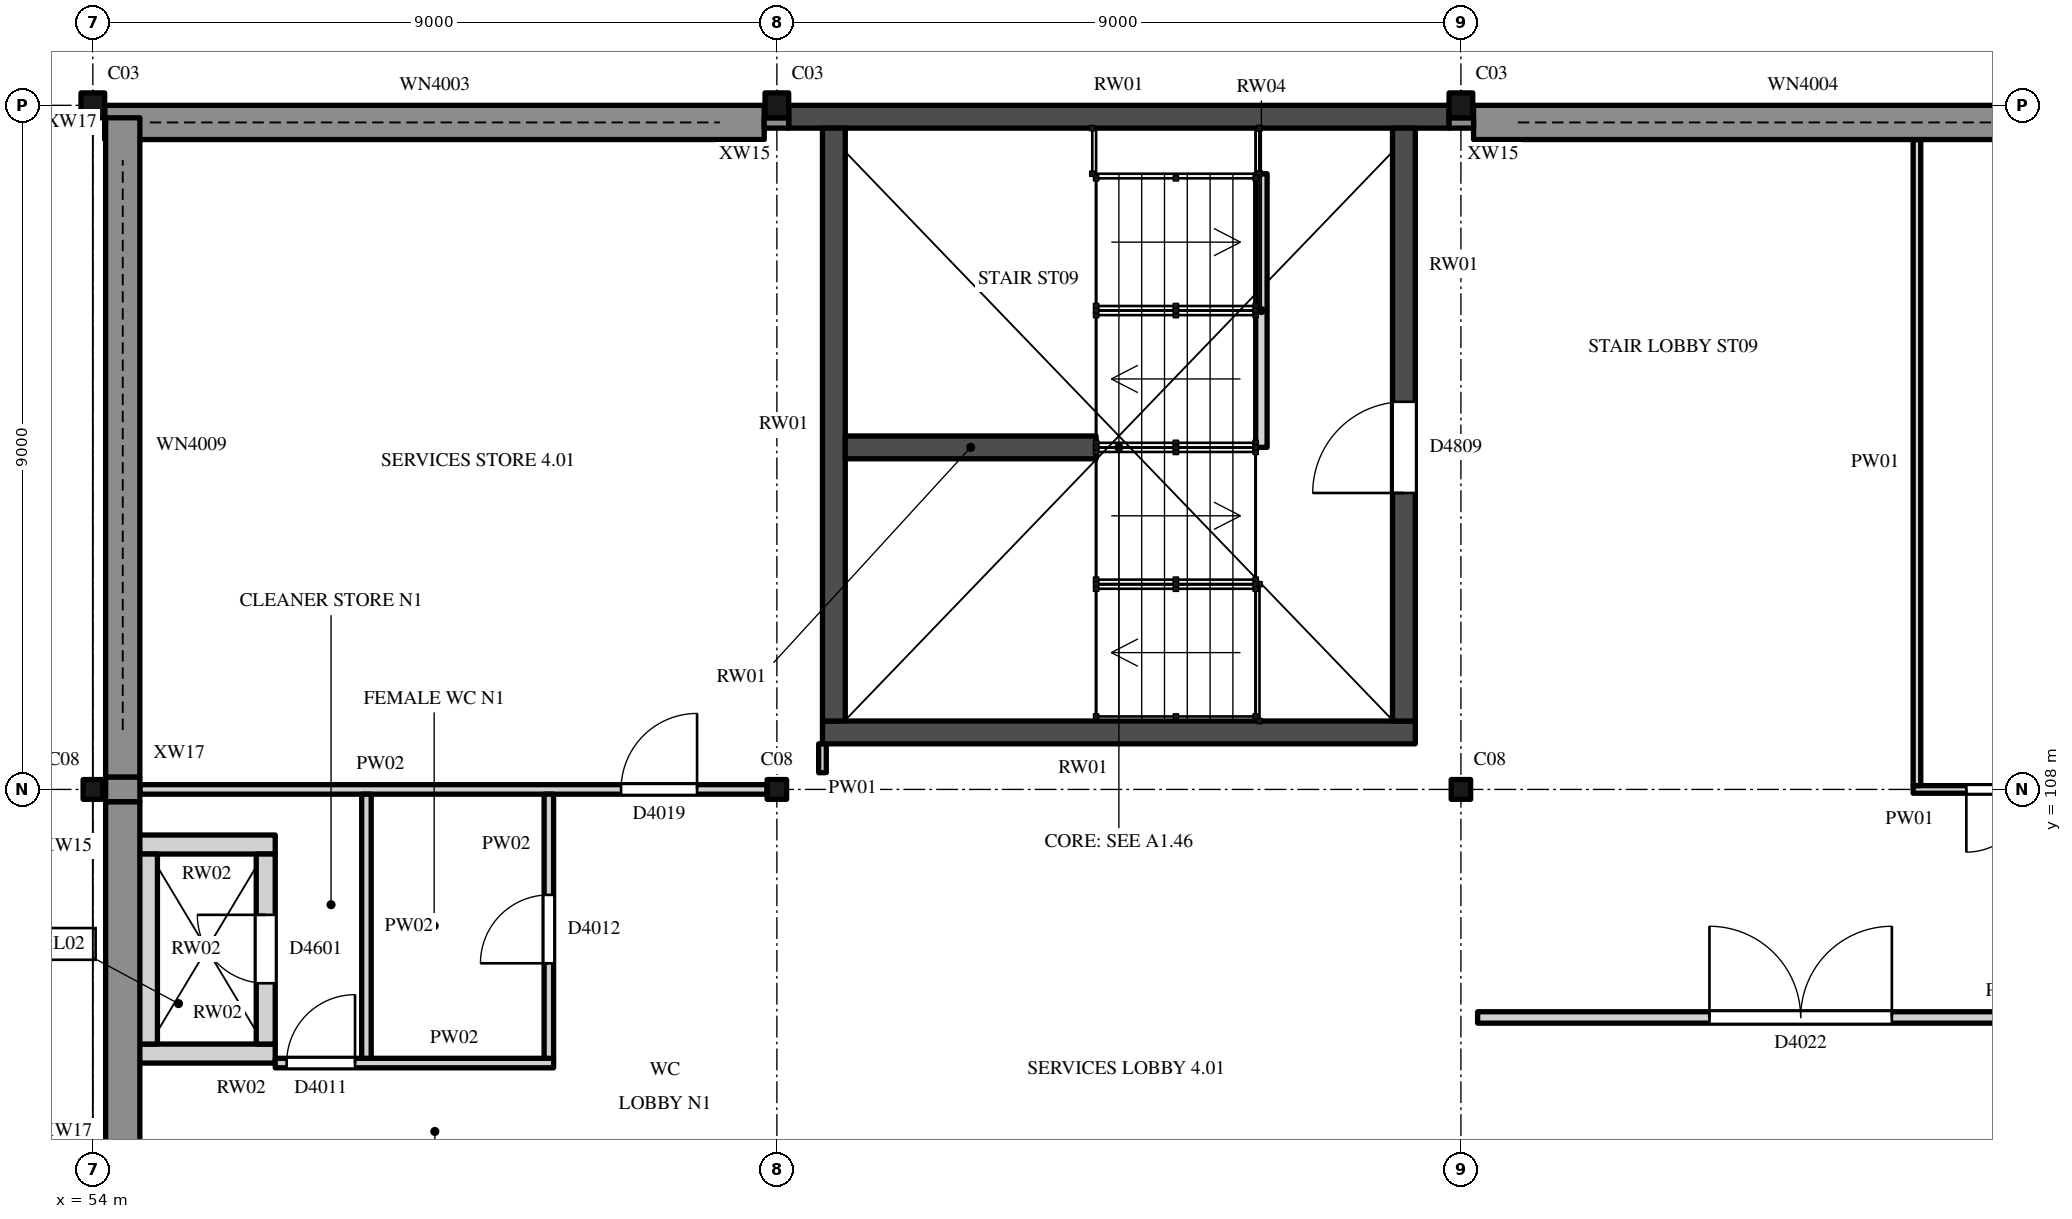
"""IFC4 building model, lengths in metres.
Left out: names, types, materials, properties, quantities, classifications, styles, units other than length and angle.
Written with IfcOpenShell. Run it as: python <this file> out.ifc"""

import sys

from ifc_helpers import new_model, si_unit, direction, frame, frame_2d, origin, origin_2d, place, context, subcontext, project, spatial, rectangle, i_section, extrude, element, fill, save


model = new_model("IFC4")
c1 = context("Model", 3, precision=1e-05, world=origin(), true_north=direction((0.0, 1.0)))
c2 = subcontext(c1, "Body", "Model", "MODEL_VIEW")
j1 = project(units=[si_unit("LENGTHUNIT", "METRE"), si_unit("PLANEANGLEUNIT", "RADIAN")], contexts=[c1])
p1 = place(None, origin())
s1 = spatial("IfcSite", under=j1, at=p1, CompositionType="ELEMENT")
p2 = place(p1, origin())
s2 = spatial("IfcBuilding", under=s1, at=p2, CompositionType="ELEMENT")
p3 = place(p2, frame((0.0, 0.0, 26.0)))
s3 = spatial("IfcBuildingStorey", under=s2, at=p3, CompositionType="ELEMENT", Elevation=26.0)
for number, where, z_axis, x_axis in (
    (1, (54.0, 108.0, 0.0), (0.0, 0.0, 1.0), (1.0, 0.0, 0.0)),
    (2, (63.0, 108.0, 0.0), (0.0, 0.0, 1.0), (1.0, 0.0, 0.0)),
    (3, (72.0, 108.0, 0.0), (0.0, 0.0, 1.0), (1.0, 0.0, 0.0)),
):
    element("IfcColumn", number, at=place(p3, frame(where, z_axis=z_axis, x_axis=x_axis)), inside=s3, PredefinedType="COLUMN", context=c2, shape_type="SweptSolid", body=[
        extrude(i_section(OverallWidth=0.256, OverallDepth=0.26, WebThickness=0.01, FlangeThickness=0.017, FilletRadius=0.014, at=origin_2d()), origin(), (0.0, 0.0, 1.0), 5.0),
    ])
for number, where, z_axis, x_axis in (
    (4, (54.0, 117.0, 0.0), (0.0, 0.0, 1.0), (1.0, 0.0, 0.0)),
    (5, (63.0, 117.0, 0.0), (0.0, 0.0, 1.0), (1.0, 0.0, 0.0)),
    (6, (72.0, 117.0, 0.0), (0.0, 0.0, 1.0), (1.0, 0.0, 0.0)),
):
    element("IfcColumn", number, at=place(p3, frame(where, z_axis=z_axis, x_axis=x_axis)), inside=s3, PredefinedType="COLUMN", context=c2, shape_type="SweptSolid", body=[
        extrude(i_section(OverallWidth=0.311, OverallDepth=0.327, WebThickness=0.016, FlangeThickness=0.025, FilletRadius=0.017, at=origin_2d()), origin(), (0.0, 0.0, 1.0), 5.0),
    ])
p4 = place(p3, frame((63.6, 108.75, 0.0), z_axis=(0.0, 0.0, 1.0), x_axis=(1.0, 0.0, 0.0)))
e7 = element("IfcWall", 7, at=p4, inside=s3, PredefinedType="SHEAR", context=c2, shape_type="SweptSolid", body=[
    extrude(rectangle(XDim=7.8, YDim=0.3, at=frame_2d((3.9, 0.0))), origin(), (0.0, 0.0, 1.0), 5.0),
])
p5 = place(p3, frame((63.156, 116.85, 0.0), z_axis=(0.0, 0.0, 1.0), x_axis=(1.0, 0.0, 0.0)))
e8 = element("IfcWall", 8, at=p5, inside=s3, PredefinedType="SHEAR", context=c2, shape_type="SweptSolid", body=[
    extrude(rectangle(XDim=8.689, YDim=0.3, at=frame_2d((4.344, 0.0))), origin(), (0.0, 0.0, 1.0), 5.0),
])
p6 = place(p3, frame((63.75, 108.9, 0.0), z_axis=(0.0, 0.0, 1.0), x_axis=(0.0, 1.0, 0.0)))
e9 = element("IfcWall", 9, at=p6, inside=s3, PredefinedType="SHEAR", context=c2, shape_type="SweptSolid", body=[
    extrude(rectangle(XDim=7.8, YDim=0.3, at=frame_2d((3.9, 0.0))), origin(), (0.0, 0.0, 1.0), 5.0),
])
p7 = place(p3, frame((71.25, 108.9, 0.0), z_axis=(0.0, 0.0, 1.0), x_axis=(0.0, 1.0, 0.0)))
e10 = element("IfcWall", 10, at=p7, inside=s3, PredefinedType="SHEAR", context=c2, shape_type="SweptSolid", body=[
    extrude(rectangle(XDim=7.8, YDim=0.3, at=frame_2d((3.9, 0.0))), origin(), (0.0, 0.0, 1.0), 5.0),
])
p8 = place(p7, frame((3.0, 0.0, 0.0)))
e11 = element("IfcOpeningElement", 11, at=p8, cuts=e10, PredefinedType="OPENING", context=c2, shape_type="SweptSolid", body=[
    extrude(rectangle(XDim=1.2, YDim=2.1, at=frame_2d((0.6, 1.05))), frame((0.0, 0.16, 0.0), z_axis=(0.0, -1.0, 0.0), x_axis=(1.0, 0.0, 0.0)), (0.0, 0.0, 1.0), 0.32),
])
p9 = place(p3, frame((67.2, 112.5, 0.0), z_axis=(0.0, 0.0, 1.0), x_axis=(-1.0, 0.0, 0.0)))
e12 = element("IfcWall", 12, at=p9, inside=s3, PredefinedType="SHEAR", context=c2, shape_type="SweptSolid", body=[
    extrude(rectangle(XDim=3.3, YDim=0.3, at=frame_2d((1.65, 0.0))), origin(), (0.0, 0.0, 1.0), 5.0),
])
p10 = place(p3, frame((69.375, 112.5, 0.0), z_axis=(0.0, 0.0, 1.0), x_axis=(0.0, 1.0, 0.0)))
e13 = element("IfcWall", 13, at=p10, inside=s3, PredefinedType="STANDARD", context=c2, shape_type="SweptSolid", body=[
    extrude(rectangle(XDim=3.6, YDim=0.15, at=frame_2d((1.8, 0.0))), origin(), (0.0, 0.0, 1.0), 2.3),
])
for number, where, z_axis, x_axis in (
    (14, (54.6, 104.525, 0.0), (0.0, 0.0, 1.0), (1.0, 0.0, 0.0)),
    (15, (54.6, 107.275, 0.0), (0.0, 0.0, 1.0), (1.0, 0.0, 0.0)),
):
    element("IfcWall", number, at=place(p3, frame(where, z_axis=z_axis, x_axis=x_axis)), inside=s3, PredefinedType="STANDARD", context=c2, shape_type="SweptSolid", body=[
        extrude(rectangle(XDim=1.8, YDim=0.25, at=frame_2d((0.9, 0.0))), origin(), (0.0, 0.0, 1.0), 5.0),
    ])
p11 = place(p3, frame((54.725, 104.65, 0.0), z_axis=(0.0, 0.0, 1.0), x_axis=(0.0, 1.0, 0.0)))
e16 = element("IfcWall", 16, at=p11, inside=s3, PredefinedType="STANDARD", context=c2, shape_type="SweptSolid", body=[
    extrude(rectangle(XDim=2.5, YDim=0.25, at=frame_2d((1.25, 0.0))), origin(), (0.0, 0.0, 1.0), 5.0),
])
p12 = place(p3, frame((56.275, 104.65, 0.0), z_axis=(0.0, 0.0, 1.0), x_axis=(0.0, 1.0, 0.0)))
e17 = element("IfcWall", 17, at=p12, inside=s3, PredefinedType="STANDARD", context=c2, shape_type="SweptSolid", body=[
    extrude(rectangle(XDim=2.5, YDim=0.25, at=frame_2d((1.25, 0.0))), origin(), (0.0, 0.0, 1.0), 5.0),
])
p13 = place(p12, frame((0.8, 0.0, 0.0)))
e18 = element("IfcOpeningElement", 18, at=p13, cuts=e17, PredefinedType="OPENING", context=c2, shape_type="SweptSolid", body=[
    extrude(rectangle(XDim=0.9, YDim=2.1, at=frame_2d((0.45, 1.05))), frame((0.0, 0.135, 0.0), z_axis=(0.0, -1.0, 0.0), x_axis=(1.0, 0.0, 0.0)), (0.0, 0.0, 1.0), 0.27),
])
p14 = place(p3, frame((54.394, 99.161, 0.0), z_axis=(0.0, 0.0, 1.0), x_axis=(0.0, 1.0, 0.0)))
e19 = element("IfcWall", 19, at=p14, inside=s3, PredefinedType="SOLIDWALL", context=c2, shape_type="SweptSolid", body=[
    extrude(rectangle(XDim=8.678, YDim=0.45, at=frame_2d((4.339, 0.0))), origin(), (0.0, 0.0, 1.0), 4.498),
])
p15 = place(p3, frame((54.156, 116.775, 0.0), z_axis=(0.0, 0.0, 1.0), x_axis=(1.0, 0.0, 0.0)))
e20 = element("IfcWall", 20, at=p15, inside=s3, PredefinedType="SOLIDWALL", context=c2, shape_type="SweptSolid", body=[
    extrude(rectangle(XDim=8.678, YDim=0.45, at=frame_2d((4.339, 0.0))), origin(), (0.0, 0.0, 1.0), 4.518),
])
p16 = place(p15, frame((0.594, 0.0, 1.6)))
e21 = element("IfcOpeningElement", 21, at=p16, cuts=e20, PredefinedType="OPENING", context=c2, shape_type="SweptSolid", body=[
    extrude(rectangle(XDim=7.5, YDim=1.2, at=frame_2d((3.75, 0.6))), frame((0.0, 0.235, 0.0), z_axis=(0.0, -1.0, 0.0), x_axis=(1.0, 0.0, 0.0)), (0.0, 0.0, 1.0), 0.47),
])
p17 = place(p3, frame((54.394, 108.161, 0.0), z_axis=(0.0, 0.0, 1.0), x_axis=(0.0, 1.0, 0.0)))
e22 = element("IfcWall", 22, at=p17, inside=s3, PredefinedType="SOLIDWALL", context=c2, shape_type="SweptSolid", body=[
    extrude(rectangle(XDim=8.676, YDim=0.45, at=frame_2d((4.338, 0.0))), origin(), (0.0, 0.0, 1.0), 4.498),
])
p18 = place(p17, frame((0.62, 0.0, 1.6)))
e23 = element("IfcOpeningElement", 23, at=p18, cuts=e22, PredefinedType="OPENING", context=c2, shape_type="SweptSolid", body=[
    extrude(rectangle(XDim=7.5, YDim=1.2, at=frame_2d((3.75, 0.6))), frame((0.0, 0.235, 0.0), z_axis=(0.0, -1.0, 0.0), x_axis=(1.0, 0.0, 0.0)), (0.0, 0.0, 1.0), 0.47),
])
p19 = place(p3, frame((72.167, 116.775, 0.0), z_axis=(0.0, 0.0, 1.0), x_axis=(1.0, 0.0, 0.0)))
e24 = element("IfcWall", 24, at=p19, inside=s3, PredefinedType="SOLIDWALL", context=c2, shape_type="SweptSolid", body=[
    extrude(rectangle(XDim=8.673, YDim=0.45, at=frame_2d((4.336, 0.0))), origin(), (0.0, 0.0, 1.0), 4.518),
])
p20 = place(p19, frame((0.583, 0.0, 1.6)))
e25 = element("IfcOpeningElement", 25, at=p20, cuts=e24, PredefinedType="OPENING", context=c2, shape_type="SweptSolid", body=[
    extrude(rectangle(XDim=7.5, YDim=1.2, at=frame_2d((3.75, 0.6))), frame((0.0, 0.235, 0.0), z_axis=(0.0, -1.0, 0.0), x_axis=(1.0, 0.0, 0.0)), (0.0, 0.0, 1.0), 0.47),
])
for number, where, z_axis, x_axis in (
    (26, (62.833, 116.768, 0.0), (0.0, 0.0, 1.0), (1.0, 0.0, 0.0)),
    (27, (71.844, 116.768, 0.0), (0.0, 0.0, 1.0), (1.0, 0.0, 0.0)),
):
    element("IfcWall", number, at=place(p3, frame(where, z_axis=z_axis, x_axis=x_axis)), inside=s3, PredefinedType="SOLIDWALL", context=c2, shape_type="SweptSolid", body=[
        extrude(rectangle(XDim=0.322, YDim=0.136, at=frame_2d((0.161, 0.0))), origin(), (0.0, 0.0, 1.0), 5.0),
    ])
p21 = place(p3, frame((54.394, 107.839, 0.0), z_axis=(0.0, 0.0, 1.0), x_axis=(0.0, 1.0, 0.0)))
e28 = element("IfcWall", 28, at=p21, inside=s3, PredefinedType="SOLIDWALL", context=c2, shape_type="SweptSolid", body=[
    extrude(rectangle(XDim=0.322, YDim=0.45, at=frame_2d((0.161, 0.0))), origin(), (0.0, 0.0, 1.0), 4.498),
])
p22 = place(p3, frame((56.4, 104.4, 0.0), z_axis=(0.0, 0.0, 1.0), x_axis=(1.0, 0.0, 0.0)))
e29 = element("IfcWall", 29, at=p22, inside=s3, PredefinedType="PARTITIONING", context=c2, shape_type="SweptSolid", body=[
    extrude(rectangle(XDim=3.663, YDim=0.125, at=frame_2d((1.831, 0.0))), origin(), (0.0, 0.0, 1.0), 4.825),
])
p23 = place(p22, frame((0.15, 0.0, 0.0)))
e30 = element("IfcOpeningElement", 30, at=p23, cuts=e29, PredefinedType="OPENING", context=c2, shape_type="SweptSolid", body=[
    extrude(rectangle(XDim=0.9, YDim=2.1, at=frame_2d((0.45, 1.05))), frame((0.0, 0.073, 0.0), z_axis=(0.0, -1.0, 0.0), x_axis=(1.0, 0.0, 0.0)), (0.0, 0.0, 1.0), 0.145),
])
p24 = place(p3, frame((72.22, 105.0, 0.0), z_axis=(0.0, 0.0, 1.0), x_axis=(1.0, 0.0, 0.0)))
e31 = element("IfcWall", 31, at=p24, inside=s3, PredefinedType="PARTITIONING", context=c2, shape_type="SweptSolid", body=[
    extrude(rectangle(XDim=8.56, YDim=0.15, at=frame_2d((4.28, 0.0))), origin(), (0.0, 0.0, 1.0), 4.521),
])
p25 = place(p24, frame((3.05, 0.0, 0.0)))
e32 = element("IfcOpeningElement", 32, at=p25, cuts=e31, PredefinedType="OPENING", context=c2, shape_type="SweptSolid", body=[
    extrude(rectangle(XDim=2.4, YDim=3.0, at=frame_2d((1.2, 1.5))), frame((0.0, 0.085, 0.0), z_axis=(0.0, -1.0, 0.0), x_axis=(1.0, 0.0, 0.0)), (0.0, 0.0, 1.0), 0.17),
])
p26 = place(p3, frame((54.619, 108.0, 0.0), z_axis=(0.0, 0.0, 1.0), x_axis=(1.0, 0.0, 0.0)))
e33 = element("IfcWall", 33, at=p26, inside=s3, PredefinedType="PARTITIONING", context=c2, shape_type="SweptSolid", body=[
    extrude(rectangle(XDim=8.253, YDim=0.125, at=frame_2d((4.127, 0.0))), origin(), (0.0, 0.0, 1.0), 4.518),
])
p27 = place(p26, frame((6.331, 0.0, 0.0)))
e34 = element("IfcOpeningElement", 34, at=p27, cuts=e33, PredefinedType="OPENING", context=c2, shape_type="SweptSolid", body=[
    extrude(rectangle(XDim=1.0, YDim=2.1, at=frame_2d((0.5, 1.05))), frame((0.0, 0.073, 0.0), z_axis=(0.0, -1.0, 0.0), x_axis=(1.0, 0.0, 0.0)), (0.0, 0.0, 1.0), 0.145),
])
p28 = place(p3, frame((77.95, 108.0, 0.0), z_axis=(0.0, 0.0, 1.0), x_axis=(1.0, 0.0, 0.0)))
e35 = element("IfcWall", 35, at=p28, inside=s3, PredefinedType="PARTITIONING", context=c2, shape_type="SweptSolid", body=[
    extrude(rectangle(XDim=2.922, YDim=0.1, at=frame_2d((1.461, 0.0))), origin(), (0.0, 0.0, 1.0), 4.518),
])
p29 = place(p28, frame((0.7, 0.0, 0.0)))
e36 = element("IfcOpeningElement", 36, at=p29, cuts=e35, PredefinedType="OPENING", context=c2, shape_type="SweptSolid", body=[
    extrude(rectangle(XDim=1.65, YDim=2.1, at=frame_2d((0.825, 1.05))), frame((0.0, 0.06, 0.0), z_axis=(0.0, -1.0, 0.0), x_axis=(1.0, 0.0, 0.0)), (0.0, 0.0, 1.0), 0.12),
])
p30 = place(p3, frame((57.6, 104.462, 0.0), z_axis=(0.0, 0.0, 1.0), x_axis=(0.0, 1.0, 0.0)))
e37 = element("IfcWall", 37, at=p30, inside=s3, PredefinedType="PARTITIONING", context=c2, shape_type="SweptSolid", body=[
    extrude(rectangle(XDim=3.475, YDim=0.125, at=frame_2d((1.738, 0.0))), origin(), (0.0, 0.0, 1.0), 4.825),
])
p31 = place(p3, frame((60.0, 104.462, 0.0), z_axis=(0.0, 0.0, 1.0), x_axis=(0.0, 1.0, 0.0)))
e38 = element("IfcWall", 38, at=p31, inside=s3, PredefinedType="PARTITIONING", context=c2, shape_type="SweptSolid", body=[
    extrude(rectangle(XDim=3.475, YDim=0.125, at=frame_2d((1.738, 0.0))), origin(), (0.0, 0.0, 1.0), 4.825),
])
p32 = place(p31, frame((1.25, 0.0, 0.0)))
e39 = element("IfcOpeningElement", 39, at=p32, cuts=e38, PredefinedType="OPENING", context=c2, shape_type="SweptSolid", body=[
    extrude(rectangle(XDim=0.9, YDim=2.1, at=frame_2d((0.45, 1.05))), frame((0.0, 0.073, 0.0), z_axis=(0.0, -1.0, 0.0), x_axis=(1.0, 0.0, 0.0)), (0.0, 0.0, 1.0), 0.145),
])
p33 = place(p3, frame((63.6, 108.22, 0.0), z_axis=(0.0, 0.0, 1.0), x_axis=(0.0, 1.0, 0.0)))
e40 = element("IfcWall", 40, at=p33, inside=s3, PredefinedType="PARTITIONING", context=c2, shape_type="SweptSolid", body=[
    extrude(rectangle(XDim=0.38, YDim=0.1, at=frame_2d((0.19, 0.0))), origin(), (0.0, 0.0, 1.0), 4.825),
])
p34 = place(p3, frame((78.0, 108.05, 0.0), z_axis=(0.0, 0.0, 1.0), x_axis=(0.0, 1.0, 0.0)))
e41 = element("IfcWall", 41, at=p34, inside=s3, PredefinedType="PARTITIONING", context=c2, shape_type="SweptSolid", body=[
    extrude(rectangle(XDim=8.5, YDim=0.1, at=frame_2d((4.25, 0.0))), origin(), (0.0, 0.0, 1.0), 4.825),
])
p35 = place(p8, origin())
e42 = element("IfcDoor", 42, at=p35, inside=s3, OperationType="SINGLE_SWING_RIGHT", PredefinedType="DOOR", context=c2, shape_type="SweptSolid", body=[
    extrude(rectangle(XDim=1.2, YDim=2.1, at=frame_2d((0.6, 1.05))), frame((0.0, 0.025, 0.0), z_axis=(0.0, -1.0, 0.0), x_axis=(1.0, 0.0, 0.0)), (0.0, 0.0, 1.0), 0.05),
])
fill(e11, e42)
p36 = place(p13, origin())
e43 = element("IfcDoor", 43, at=p36, inside=s3, OperationType="SINGLE_SWING_LEFT", PredefinedType="DOOR", context=c2, shape_type="SweptSolid", body=[
    extrude(rectangle(XDim=0.9, YDim=2.1, at=frame_2d((0.45, 1.05))), frame((0.0, 0.025, 0.0), z_axis=(0.0, -1.0, 0.0), x_axis=(1.0, 0.0, 0.0)), (0.0, 0.0, 1.0), 0.05),
])
fill(e18, e43)
p37 = place(p16, origin())
e44 = element("IfcWindow", 44, at=p37, inside=s3, PartitioningType="SINGLE_PANEL", PredefinedType="WINDOW", context=c2, shape_type="SweptSolid", body=[
    extrude(rectangle(XDim=7.5, YDim=1.2, at=frame_2d((3.75, 0.6))), frame((0.0, 0.03, 0.0), z_axis=(0.0, -1.0, 0.0), x_axis=(1.0, 0.0, 0.0)), (0.0, 0.0, 1.0), 0.06),
])
fill(e21, e44)
p38 = place(p20, origin())
e45 = element("IfcWindow", 45, at=p38, inside=s3, PartitioningType="SINGLE_PANEL", PredefinedType="WINDOW", context=c2, shape_type="SweptSolid", body=[
    extrude(rectangle(XDim=7.5, YDim=1.2, at=frame_2d((3.75, 0.6))), frame((0.0, 0.03, 0.0), z_axis=(0.0, -1.0, 0.0), x_axis=(1.0, 0.0, 0.0)), (0.0, 0.0, 1.0), 0.06),
])
fill(e25, e45)
p39 = place(p18, origin())
e46 = element("IfcWindow", 46, at=p39, inside=s3, PartitioningType="SINGLE_PANEL", PredefinedType="WINDOW", context=c2, shape_type="SweptSolid", body=[
    extrude(rectangle(XDim=7.5, YDim=1.2, at=frame_2d((3.75, 0.6))), frame((0.0, 0.03, 0.0), z_axis=(0.0, -1.0, 0.0), x_axis=(1.0, 0.0, 0.0)), (0.0, 0.0, 1.0), 0.06),
])
fill(e23, e46)
p40 = place(p23, origin())
e47 = element("IfcDoor", 47, at=p40, inside=s3, OperationType="SINGLE_SWING_LEFT", PredefinedType="DOOR", context=c2, shape_type="SweptSolid", body=[
    extrude(rectangle(XDim=0.9, YDim=2.1, at=frame_2d((0.45, 1.05))), frame((0.0, 0.025, 0.0), z_axis=(0.0, -1.0, 0.0), x_axis=(1.0, 0.0, 0.0)), (0.0, 0.0, 1.0), 0.05),
])
fill(e30, e47)
p41 = place(p32, origin())
e48 = element("IfcDoor", 48, at=p41, inside=s3, OperationType="SINGLE_SWING_RIGHT", PredefinedType="DOOR", context=c2, shape_type="SweptSolid", body=[
    extrude(rectangle(XDim=0.9, YDim=2.1, at=frame_2d((0.45, 1.05))), frame((0.0, 0.025, 0.0), z_axis=(0.0, -1.0, 0.0), x_axis=(1.0, 0.0, 0.0)), (0.0, 0.0, 1.0), 0.05),
])
fill(e39, e48)
p42 = place(p27, origin())
e49 = element("IfcDoor", 49, at=p42, inside=s3, OperationType="SINGLE_SWING_LEFT", PredefinedType="DOOR", context=c2, shape_type="SweptSolid", body=[
    extrude(rectangle(XDim=1.0, YDim=2.1, at=frame_2d((0.5, 1.05))), frame((0.0, 0.025, 0.0), z_axis=(0.0, -1.0, 0.0), x_axis=(1.0, 0.0, 0.0)), (0.0, 0.0, 1.0), 0.05),
])
fill(e34, e49)
p43 = place(p25, origin())
e50 = element("IfcDoor", 50, at=p43, inside=s3, OperationType="DOUBLE_DOOR_SINGLE_SWING", PredefinedType="DOOR", context=c2, shape_type="SweptSolid", body=[
    extrude(rectangle(XDim=2.4, YDim=3.0, at=frame_2d((1.2, 1.5))), frame((0.0, 0.025, 0.0), z_axis=(0.0, -1.0, 0.0), x_axis=(1.0, 0.0, 0.0)), (0.0, 0.0, 1.0), 0.05),
])
fill(e32, e50)
p44 = place(p29, origin())
e51 = element("IfcDoor", 51, at=p44, inside=s3, OperationType="DOUBLE_DOOR_SINGLE_SWING", PredefinedType="DOOR", context=c2, shape_type="SweptSolid", body=[
    extrude(rectangle(XDim=1.65, YDim=2.1, at=frame_2d((0.825, 1.05))), frame((0.0, 0.025, 0.0), z_axis=(0.0, -1.0, 0.0), x_axis=(1.0, 0.0, 0.0)), (0.0, 0.0, 1.0), 0.05),
])
fill(e36, e51)
save(model, sys.argv[1])
